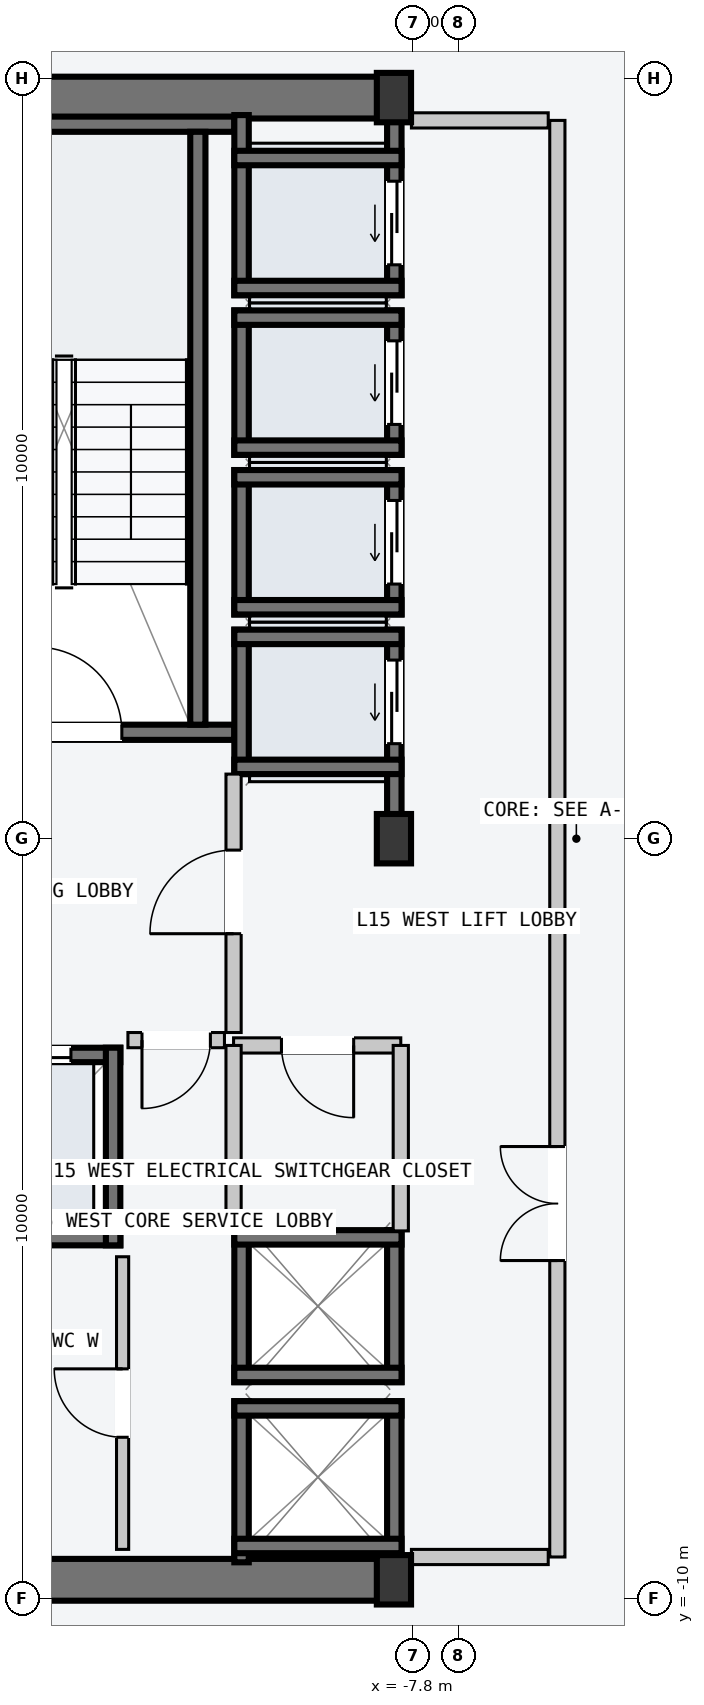
"""IFC4 building model, lengths in metres.
Left out: names, types, materials, properties, quantities, classifications, styles, units other than length and angle.
Written with IfcOpenShell. Run it as: python <this file> out.ifc"""

import sys

from ifc_helpers import new_model, si_unit, direction, frame, frame_2d, origin, origin_2d, place, context, subcontext, project, spatial, rectangle, i_section, extrude, element, fill, save


model = new_model("IFC4")
c1 = context("Model", 3, precision=1e-05, world=origin(), true_north=direction((0.0, 1.0)))
c2 = subcontext(c1, "Body", "Model", "MODEL_VIEW")
j1 = project(units=[si_unit("LENGTHUNIT", "METRE"), si_unit("PLANEANGLEUNIT", "RADIAN")], contexts=[c1])
p1 = place(None, origin())
s1 = spatial("IfcSite", under=j1, at=p1, CompositionType="ELEMENT")
p2 = place(p1, origin())
s2 = spatial("IfcBuilding", under=s1, at=p2, CompositionType="ELEMENT")
p3 = place(p2, frame((0.0, 0.0, 60.0)))
s3 = spatial("IfcBuildingStorey", under=s2, at=p3, CompositionType="ELEMENT", Elevation=60.0)
for number, where, z_axis, x_axis in (
    (1, (-14.53, -9.75, -0.2), (0.0, 0.0, 1.0), (1.0, 0.0, 0.0)),
    (2, (-14.53, 9.75, -0.2), (0.0, 0.0, 1.0), (1.0, 0.0, 0.0)),
):
    element("IfcWall", number, at=place(p3, frame(where, z_axis=z_axis, x_axis=x_axis)), inside=s3, PredefinedType="SHEAR", context=c2, shape_type="SweptSolid", body=[
        extrude(rectangle(XDim=6.46, YDim=0.55, at=frame_2d((3.23, 0.0))), origin(), (0.0, 0.0, 1.0), 3.6),
    ])
p4 = place(p3, frame((-14.25, 1.4, -0.2), z_axis=(0.0, 0.0, 1.0), x_axis=(1.0, 0.0, 0.0)))
e3 = element("IfcWall", 3, at=p4, inside=s3, PredefinedType="SOLIDWALL", context=c2, shape_type="SweptSolid", body=[
    extrude(rectangle(XDim=4.1, YDim=0.2, at=frame_2d((2.05, 0.0))), origin(), (0.0, 0.0, 1.0), 3.6),
])
p5 = place(p4, frame((1.5, 0.0, 0.2)))
e4 = element("IfcOpeningElement", 4, at=p5, cuts=e3, PredefinedType="OPENING", context=c2, shape_type="SweptSolid", body=[
    extrude(rectangle(XDim=1.12, YDim=2.18, at=frame_2d((0.56, 1.09))), frame((0.0, 0.11, 0.0), z_axis=(0.0, -1.0, 0.0), x_axis=(1.0, 0.0, 0.0)), (0.0, 0.0, 1.0), 0.22),
])
p6 = place(p3, frame((-14.25, 9.4, -0.2), z_axis=(0.0, 0.0, 1.0), x_axis=(1.0, 0.0, 0.0)))
e5 = element("IfcWall", 5, at=p6, inside=s3, PredefinedType="SOLIDWALL", context=c2, shape_type="SweptSolid", body=[
    extrude(rectangle(XDim=4.1, YDim=0.2, at=frame_2d((2.05, 0.0))), origin(), (0.0, 0.0, 1.0), 3.6),
])
p7 = place(p3, frame((-10.63, 1.5, -0.2), z_axis=(0.0, 0.0, 1.0), x_axis=(0.0, 1.0, 0.0)))
e6 = element("IfcWall", 6, at=p7, inside=s3, PredefinedType="SOLIDWALL", context=c2, shape_type="SweptSolid", body=[
    extrude(rectangle(XDim=7.8, YDim=0.2, at=frame_2d((3.9, 0.0))), origin(), (0.0, 0.0, 1.0), 3.6),
])
for number, where, z_axis, x_axis in (
    (7, (-8.05, -9.75, 0.0), (0.0, 0.0, 1.0), (1.0, 0.0, 0.0)),
    (8, (-8.05, 0.0, 0.0), (0.0, 0.0, 1.0), (1.0, 0.0, 0.0)),
    (9, (-8.05, 9.75, 0.0), (0.0, 0.0, 1.0), (1.0, 0.0, 0.0)),
):
    element("IfcColumn", number, at=place(p3, frame(where, z_axis=z_axis, x_axis=x_axis)), inside=s3, PredefinedType="COLUMN", context=c2, shape_type="SweptSolid", body=[
        extrude(i_section(OverallWidth=0.45, OverallDepth=0.65, WebThickness=0.025, FlangeThickness=0.04, at=origin_2d()), origin(), (0.0, 0.0, 1.0), 3.6),
    ])
p8 = place(p3, frame((-8.045, 0.21, -0.2), z_axis=(0.0, 0.0, 1.0), x_axis=(0.0, 1.0, 0.0)))
e10 = element("IfcWall", 10, at=p8, inside=s3, PredefinedType="SOLIDWALL", context=c2, shape_type="SweptSolid", body=[
    extrude(rectangle(XDim=2.54, YDim=0.19, at=frame_2d((1.27, 0.0))), origin(), (0.0, 0.0, 1.0), 3.6),
])
p9 = place(p8, frame((1.04, 0.0, 0.2)))
e11 = element("IfcOpeningElement", 11, at=p9, cuts=e10, PredefinedType="OPENING", context=c2, shape_type="SweptSolid", body=[
    extrude(rectangle(XDim=1.1, YDim=2.2, at=frame_2d((0.55, 1.1))), frame((0.0, 0.105, 0.0), z_axis=(0.0, -1.0, 0.0), x_axis=(1.0, 0.0, 0.0)), (0.0, 0.0, 1.0), 0.21),
])
p10 = place(p3, frame((-10.055, 0.85, -0.2), z_axis=(0.0, 0.0, 1.0), x_axis=(0.0, 1.0, 0.0)))
e12 = element("IfcWall", 12, at=p10, inside=s3, PredefinedType="SOLIDWALL", context=c2, shape_type="SweptSolid", body=[
    extrude(rectangle(XDim=1.9, YDim=0.19, at=frame_2d((0.95, 0.0))), origin(), (0.0, 0.0, 1.0), 3.6),
])
for number, where, z_axis, x_axis in (
    (13, (-10.15, 2.655, -0.2), (0.0, 0.0, 1.0), (1.0, 0.0, 0.0)),
    (14, (-10.15, 0.945, -0.2), (0.0, 0.0, 1.0), (1.0, 0.0, 0.0)),
):
    element("IfcWall", number, at=place(p3, frame(where, z_axis=z_axis, x_axis=x_axis)), inside=s3, PredefinedType="SOLIDWALL", context=c2, shape_type="SweptSolid", body=[
        extrude(rectangle(XDim=2.2, YDim=0.19, at=frame_2d((1.1, 0.0))), origin(), (0.0, 0.0, 1.0), 3.6),
    ])
p11 = place(p3, frame((-8.045, 2.95, -0.2), z_axis=(0.0, 0.0, 1.0), x_axis=(0.0, 1.0, 0.0)))
e15 = element("IfcWall", 15, at=p11, inside=s3, PredefinedType="SOLIDWALL", context=c2, shape_type="SweptSolid", body=[
    extrude(rectangle(XDim=1.9, YDim=0.19, at=frame_2d((0.95, 0.0))), origin(), (0.0, 0.0, 1.0), 3.6),
])
p12 = place(p11, frame((0.4, 0.0, 0.2)))
e16 = element("IfcOpeningElement", 16, at=p12, cuts=e15, PredefinedType="OPENING", context=c2, shape_type="SweptSolid", body=[
    extrude(rectangle(XDim=1.1, YDim=2.2, at=frame_2d((0.55, 1.1))), frame((0.0, 0.105, 0.0), z_axis=(0.0, -1.0, 0.0), x_axis=(1.0, 0.0, 0.0)), (0.0, 0.0, 1.0), 0.21),
])
p13 = place(p3, frame((-10.055, 2.95, -0.2), z_axis=(0.0, 0.0, 1.0), x_axis=(0.0, 1.0, 0.0)))
e17 = element("IfcWall", 17, at=p13, inside=s3, PredefinedType="SOLIDWALL", context=c2, shape_type="SweptSolid", body=[
    extrude(rectangle(XDim=1.9, YDim=0.19, at=frame_2d((0.95, 0.0))), origin(), (0.0, 0.0, 1.0), 3.6),
])
for number, where, z_axis, x_axis in (
    (18, (-10.15, 4.755, -0.2), (0.0, 0.0, 1.0), (1.0, 0.0, 0.0)),
    (19, (-10.15, 3.045, -0.2), (0.0, 0.0, 1.0), (1.0, 0.0, 0.0)),
):
    element("IfcWall", number, at=place(p3, frame(where, z_axis=z_axis, x_axis=x_axis)), inside=s3, PredefinedType="SOLIDWALL", context=c2, shape_type="SweptSolid", body=[
        extrude(rectangle(XDim=2.2, YDim=0.19, at=frame_2d((1.1, 0.0))), origin(), (0.0, 0.0, 1.0), 3.6),
    ])
p14 = place(p3, frame((-8.045, 5.05, -0.2), z_axis=(0.0, 0.0, 1.0), x_axis=(0.0, 1.0, 0.0)))
e20 = element("IfcWall", 20, at=p14, inside=s3, PredefinedType="SOLIDWALL", context=c2, shape_type="SweptSolid", body=[
    extrude(rectangle(XDim=1.9, YDim=0.19, at=frame_2d((0.95, 0.0))), origin(), (0.0, 0.0, 1.0), 3.6),
])
p15 = place(p14, frame((0.4, 0.0, 0.2)))
e21 = element("IfcOpeningElement", 21, at=p15, cuts=e20, PredefinedType="OPENING", context=c2, shape_type="SweptSolid", body=[
    extrude(rectangle(XDim=1.1, YDim=2.2, at=frame_2d((0.55, 1.1))), frame((0.0, 0.105, 0.0), z_axis=(0.0, -1.0, 0.0), x_axis=(1.0, 0.0, 0.0)), (0.0, 0.0, 1.0), 0.21),
])
p16 = place(p3, frame((-10.055, 5.05, -0.2), z_axis=(0.0, 0.0, 1.0), x_axis=(0.0, 1.0, 0.0)))
e22 = element("IfcWall", 22, at=p16, inside=s3, PredefinedType="SOLIDWALL", context=c2, shape_type="SweptSolid", body=[
    extrude(rectangle(XDim=1.9, YDim=0.19, at=frame_2d((0.95, 0.0))), origin(), (0.0, 0.0, 1.0), 3.6),
])
for number, where, z_axis, x_axis in (
    (23, (-10.15, 6.855, -0.2), (0.0, 0.0, 1.0), (1.0, 0.0, 0.0)),
    (24, (-10.15, 5.145, -0.2), (0.0, 0.0, 1.0), (1.0, 0.0, 0.0)),
):
    element("IfcWall", number, at=place(p3, frame(where, z_axis=z_axis, x_axis=x_axis)), inside=s3, PredefinedType="SOLIDWALL", context=c2, shape_type="SweptSolid", body=[
        extrude(rectangle(XDim=2.2, YDim=0.19, at=frame_2d((1.1, 0.0))), origin(), (0.0, 0.0, 1.0), 3.6),
    ])
p17 = place(p3, frame((-8.045, 7.15, -0.2), z_axis=(0.0, 0.0, 1.0), x_axis=(0.0, 1.0, 0.0)))
e25 = element("IfcWall", 25, at=p17, inside=s3, PredefinedType="SOLIDWALL", context=c2, shape_type="SweptSolid", body=[
    extrude(rectangle(XDim=2.37, YDim=0.19, at=frame_2d((1.185, 0.0))), origin(), (0.0, 0.0, 1.0), 3.6),
])
p18 = place(p17, frame((0.4, 0.0, 0.2)))
e26 = element("IfcOpeningElement", 26, at=p18, cuts=e25, PredefinedType="OPENING", context=c2, shape_type="SweptSolid", body=[
    extrude(rectangle(XDim=1.1, YDim=2.2, at=frame_2d((0.55, 1.1))), frame((0.0, 0.105, 0.0), z_axis=(0.0, -1.0, 0.0), x_axis=(1.0, 0.0, 0.0)), (0.0, 0.0, 1.0), 0.21),
])
p19 = place(p3, frame((-10.055, 7.15, -0.2), z_axis=(0.0, 0.0, 1.0), x_axis=(0.0, 1.0, 0.0)))
e27 = element("IfcWall", 27, at=p19, inside=s3, PredefinedType="SOLIDWALL", context=c2, shape_type="SweptSolid", body=[
    extrude(rectangle(XDim=2.37, YDim=0.19, at=frame_2d((1.185, 0.0))), origin(), (0.0, 0.0, 1.0), 3.6),
])
for number, where, z_axis, x_axis in (
    (28, (-10.15, 8.955, -0.2), (0.0, 0.0, 1.0), (1.0, 0.0, 0.0)),
    (29, (-10.15, 7.245, -0.2), (0.0, 0.0, 1.0), (1.0, 0.0, 0.0)),
):
    element("IfcWall", number, at=place(p3, frame(where, z_axis=z_axis, x_axis=x_axis)), inside=s3, PredefinedType="SOLIDWALL", context=c2, shape_type="SweptSolid", body=[
        extrude(rectangle(XDim=2.2, YDim=0.19, at=frame_2d((1.1, 0.0))), origin(), (0.0, 0.0, 1.0), 3.6),
    ])
for number, where, z_axis, x_axis in (
    (30, (-8.045, -9.52, -0.2), (0.0, 0.0, 1.0), (0.0, 1.0, 0.0)),
    (31, (-10.055, -9.52, -0.2), (0.0, 0.0, 1.0), (0.0, 1.0, 0.0)),
):
    element("IfcWall", number, at=place(p3, frame(where, z_axis=z_axis, x_axis=x_axis)), inside=s3, PredefinedType="SOLIDWALL", context=c2, shape_type="SweptSolid", body=[
        extrude(rectangle(XDim=2.12, YDim=0.19, at=frame_2d((1.06, 0.0))), origin(), (0.0, 0.0, 1.0), 3.6),
    ])
for number, where, z_axis, x_axis in (
    (32, (-10.15, -7.495, -0.2), (0.0, 0.0, 1.0), (1.0, 0.0, 0.0)),
    (33, (-10.15, -9.305, -0.2), (0.0, 0.0, 1.0), (1.0, 0.0, 0.0)),
):
    element("IfcWall", number, at=place(p3, frame(where, z_axis=z_axis, x_axis=x_axis)), inside=s3, PredefinedType="SOLIDWALL", context=c2, shape_type="SweptSolid", body=[
        extrude(rectangle(XDim=2.2, YDim=0.19, at=frame_2d((1.1, 0.0))), origin(), (0.0, 0.0, 1.0), 3.6),
    ])
for number, where, z_axis, x_axis in (
    (34, (-8.045, -7.15, -0.2), (0.0, 0.0, 1.0), (0.0, 1.0, 0.0)),
    (35, (-10.055, -7.15, -0.2), (0.0, 0.0, 1.0), (0.0, 1.0, 0.0)),
):
    element("IfcWall", number, at=place(p3, frame(where, z_axis=z_axis, x_axis=x_axis)), inside=s3, PredefinedType="SOLIDWALL", context=c2, shape_type="SweptSolid", body=[
        extrude(rectangle(XDim=2.0, YDim=0.19, at=frame_2d((1.0, 0.0))), origin(), (0.0, 0.0, 1.0), 3.6),
    ])
for number, where, z_axis, x_axis in (
    (36, (-10.15, -5.245, -0.2), (0.0, 0.0, 1.0), (1.0, 0.0, 0.0)),
    (37, (-10.15, -7.055, -0.2), (0.0, 0.0, 1.0), (1.0, 0.0, 0.0)),
):
    element("IfcWall", number, at=place(p3, frame(where, z_axis=z_axis, x_axis=x_axis)), inside=s3, PredefinedType="SOLIDWALL", context=c2, shape_type="SweptSolid", body=[
        extrude(rectangle(XDim=2.2, YDim=0.19, at=frame_2d((1.1, 0.0))), origin(), (0.0, 0.0, 1.0), 3.6),
    ])
p20 = place(p3, frame((-14.33, -2.845, -0.2), z_axis=(0.0, 0.0, 1.0), x_axis=(1.0, 0.0, 0.0)))
e38 = element("IfcWall", 38, at=p20, inside=s3, PredefinedType="SOLIDWALL", context=c2, shape_type="SweptSolid", body=[
    extrude(rectangle(XDim=2.68, YDim=0.19, at=frame_2d((1.34, 0.0))), origin(), (0.0, 0.0, 1.0), 3.6),
])
p21 = place(p20, frame((0.83, 0.0, 0.2)))
e39 = element("IfcOpeningElement", 39, at=p21, cuts=e38, PredefinedType="OPENING", context=c2, shape_type="SweptSolid", body=[
    extrude(rectangle(XDim=1.2, YDim=2.2, at=frame_2d((0.6, 1.1))), frame((0.0, 0.105, 0.0), z_axis=(0.0, -1.0, 0.0), x_axis=(1.0, 0.0, 0.0)), (0.0, 0.0, 1.0), 0.21),
])
p22 = place(p3, frame((-14.33, -5.255, -0.2), z_axis=(0.0, 0.0, 1.0), x_axis=(1.0, 0.0, 0.0)))
e40 = element("IfcWall", 40, at=p22, inside=s3, PredefinedType="SOLIDWALL", context=c2, shape_type="SweptSolid", body=[
    extrude(rectangle(XDim=2.68, YDim=0.19, at=frame_2d((1.34, 0.0))), origin(), (0.0, 0.0, 1.0), 3.6),
])
p23 = place(p3, frame((-11.745, -5.35, -0.2), z_axis=(0.0, 0.0, 1.0), x_axis=(0.0, 1.0, 0.0)))
e41 = element("IfcWall", 41, at=p23, inside=s3, PredefinedType="SOLIDWALL", context=c2, shape_type="SweptSolid", body=[
    extrude(rectangle(XDim=2.6, YDim=0.19, at=frame_2d((1.3, 0.0))), origin(), (0.0, 0.0, 1.0), 3.6),
])
p24 = place(p3, frame((-5.9, -9.45, 0.0), z_axis=(0.0, 0.0, 1.0), x_axis=(0.0, 1.0, 0.0)))
e42 = element("IfcWall", 42, at=p24, inside=s3, PredefinedType="PARTITIONING", context=c2, shape_type="SweptSolid", body=[
    extrude(rectangle(XDim=18.9, YDim=0.2, at=frame_2d((9.45, 0.0))), origin(), (0.0, 0.0, 1.0), 3.4),
])
p25 = place(p24, frame((3.9, 0.0, 0.0)))
e43 = element("IfcOpeningElement", 43, at=p25, cuts=e42, PredefinedType="OPENING", context=c2, shape_type="SweptSolid", body=[
    extrude(rectangle(XDim=1.5, YDim=2.2, at=frame_2d((0.75, 1.1))), frame((0.0, 0.11, 0.0), z_axis=(0.0, -1.0, 0.0), x_axis=(1.0, 0.0, 0.0)), (0.0, 0.0, 1.0), 0.22),
])
for number, where, z_axis, x_axis in (
    (44, (-6.02, -9.45, 0.0), (0.0, 0.0, 1.0), (-1.0, 0.0, 0.0)),
    (45, (-6.02, 9.45, 0.0), (0.0, 0.0, 1.0), (-1.0, 0.0, 0.0)),
):
    element("IfcWall", number, at=place(p3, frame(where, z_axis=z_axis, x_axis=x_axis)), inside=s3, PredefinedType="PARTITIONING", context=c2, shape_type="SweptSolid", body=[
        extrude(rectangle(XDim=1.8, YDim=0.2, at=frame_2d((0.9, 0.0))), origin(), (0.0, 0.0, 1.0), 3.4),
    ])
p26 = place(p3, frame((-10.16, -2.55, 0.0), z_axis=(0.0, 0.0, 1.0), x_axis=(0.0, 1.0, 0.0)))
e46 = element("IfcWall", 46, at=p26, inside=s3, PredefinedType="PARTITIONING", context=c2, shape_type="SweptSolid", body=[
    extrude(rectangle(XDim=3.4, YDim=0.2, at=frame_2d((1.7, 0.0))), origin(), (0.0, 0.0, 1.0), 3.4),
])
p27 = place(p26, frame((1.3, 0.0, 0.0)))
e47 = element("IfcOpeningElement", 47, at=p27, cuts=e46, PredefinedType="OPENING", context=c2, shape_type="SweptSolid", body=[
    extrude(rectangle(XDim=1.1, YDim=2.15, at=frame_2d((0.55, 1.075))), frame((0.0, 0.11, 0.0), z_axis=(0.0, -1.0, 0.0), x_axis=(1.0, 0.0, 0.0)), (0.0, 0.0, 1.0), 0.22),
])
p28 = place(p3, frame((-10.28, -2.65, 0.0), z_axis=(0.0, 0.0, 1.0), x_axis=(-1.0, 0.0, 0.0)))
e48 = element("IfcWall", 48, at=p28, inside=s3, PredefinedType="PARTITIONING", context=c2, shape_type="SweptSolid", body=[
    extrude(rectangle(XDim=1.27, YDim=0.2, at=frame_2d((0.635, 0.0))), origin(), (0.0, 0.0, 1.0), 3.4),
])
p29 = place(p28, frame((0.185, 0.0, 0.0)))
e49 = element("IfcOpeningElement", 49, at=p29, cuts=e48, PredefinedType="OPENING", context=c2, shape_type="SweptSolid", body=[
    extrude(rectangle(XDim=0.9, YDim=2.15, at=frame_2d((0.45, 1.075))), frame((0.0, 0.11, 0.0), z_axis=(0.0, -1.0, 0.0), x_axis=(1.0, 0.0, 0.0)), (0.0, 0.0, 1.0), 0.22),
])
p30 = place(p3, frame((-7.96, -2.72, 0.0), z_axis=(0.0, 0.0, 1.0), x_axis=(-1.0, 0.0, 0.0)))
e50 = element("IfcWall", 50, at=p30, inside=s3, PredefinedType="PARTITIONING", context=c2, shape_type="SweptSolid", body=[
    extrude(rectangle(XDim=2.2, YDim=0.2, at=frame_2d((1.1, 0.0))), origin(), (0.0, 0.0, 1.0), 3.4),
])
p31 = place(p30, frame((0.62, 0.0, 0.0)))
e51 = element("IfcOpeningElement", 51, at=p31, cuts=e50, PredefinedType="OPENING", context=c2, shape_type="SweptSolid", body=[
    extrude(rectangle(XDim=0.95, YDim=2.1, at=frame_2d((0.475, 1.05))), frame((0.0, 0.11, 0.0), z_axis=(0.0, -1.0, 0.0), x_axis=(1.0, 0.0, 0.0)), (0.0, 0.0, 1.0), 0.22),
])
for number, where, z_axis, x_axis in (
    (52, (-7.96, -5.16, 0.0), (0.0, 0.0, 1.0), (0.0, 1.0, 0.0)),
    (53, (-10.16, -5.16, 0.0), (0.0, 0.0, 1.0), (0.0, 1.0, 0.0)),
):
    element("IfcWall", number, at=place(p3, frame(where, z_axis=z_axis, x_axis=x_axis)), inside=s3, PredefinedType="PARTITIONING", context=c2, shape_type="SweptSolid", body=[
        extrude(rectangle(XDim=2.44, YDim=0.2, at=frame_2d((1.22, 0.0))), origin(), (0.0, 0.0, 1.0), 3.4),
    ])
p32 = place(p3, frame((-11.62, -9.35, 0.0), z_axis=(0.0, 0.0, 1.0), x_axis=(0.0, 1.0, 0.0)))
e54 = element("IfcWall", 54, at=p32, inside=s3, PredefinedType="PARTITIONING", context=c2, shape_type="SweptSolid", body=[
    extrude(rectangle(XDim=3.85, YDim=0.16, at=frame_2d((1.925, 0.0))), origin(), (0.0, 0.0, 1.0), 3.4),
])
p33 = place(p32, frame((1.475, 0.0, 0.0)))
e55 = element("IfcOpeningElement", 55, at=p33, cuts=e54, PredefinedType="OPENING", context=c2, shape_type="SweptSolid", body=[
    extrude(rectangle(XDim=0.9, YDim=2.15, at=frame_2d((0.45, 1.075))), frame((0.0, 0.09, 0.0), z_axis=(0.0, -1.0, 0.0), x_axis=(1.0, 0.0, 0.0)), (0.0, 0.0, 1.0), 0.18),
])
p34 = place(p5, origin())
e56 = element("IfcDoor", 56, at=p34, inside=s3, OperationType="SINGLE_SWING_LEFT", PredefinedType="DOOR", context=c2, shape_type="SweptSolid", body=[
    extrude(rectangle(XDim=1.12, YDim=2.18, at=frame_2d((0.56, 1.09))), frame((0.0, 0.025, 0.0), z_axis=(0.0, -1.0, 0.0), x_axis=(1.0, 0.0, 0.0)), (0.0, 0.0, 1.0), 0.05),
])
fill(e4, e56)
p35 = place(p9, origin())
e57 = element("IfcDoor", 57, at=p35, inside=s3, OperationType="SLIDING_TO_LEFT", PredefinedType="DOOR", context=c2, shape_type="SweptSolid", body=[
    extrude(rectangle(XDim=1.1, YDim=2.2, at=frame_2d((0.55, 1.1))), frame((0.0, 0.025, 0.0), z_axis=(0.0, -1.0, 0.0), x_axis=(1.0, 0.0, 0.0)), (0.0, 0.0, 1.0), 0.05),
])
fill(e11, e57)
p36 = place(p12, origin())
e58 = element("IfcDoor", 58, at=p36, inside=s3, OperationType="SLIDING_TO_LEFT", PredefinedType="DOOR", context=c2, shape_type="SweptSolid", body=[
    extrude(rectangle(XDim=1.1, YDim=2.2, at=frame_2d((0.55, 1.1))), frame((0.0, 0.025, 0.0), z_axis=(0.0, -1.0, 0.0), x_axis=(1.0, 0.0, 0.0)), (0.0, 0.0, 1.0), 0.05),
])
fill(e16, e58)
p37 = place(p15, origin())
e59 = element("IfcDoor", 59, at=p37, inside=s3, OperationType="SLIDING_TO_LEFT", PredefinedType="DOOR", context=c2, shape_type="SweptSolid", body=[
    extrude(rectangle(XDim=1.1, YDim=2.2, at=frame_2d((0.55, 1.1))), frame((0.0, 0.025, 0.0), z_axis=(0.0, -1.0, 0.0), x_axis=(1.0, 0.0, 0.0)), (0.0, 0.0, 1.0), 0.05),
])
fill(e21, e59)
p38 = place(p18, origin())
e60 = element("IfcDoor", 60, at=p38, inside=s3, OperationType="SLIDING_TO_LEFT", PredefinedType="DOOR", context=c2, shape_type="SweptSolid", body=[
    extrude(rectangle(XDim=1.1, YDim=2.2, at=frame_2d((0.55, 1.1))), frame((0.0, 0.025, 0.0), z_axis=(0.0, -1.0, 0.0), x_axis=(1.0, 0.0, 0.0)), (0.0, 0.0, 1.0), 0.05),
])
fill(e26, e60)
p39 = place(p21, origin())
e61 = element("IfcDoor", 61, at=p39, inside=s3, OperationType="SLIDING_TO_LEFT", PredefinedType="DOOR", context=c2, shape_type="SweptSolid", body=[
    extrude(rectangle(XDim=1.2, YDim=2.2, at=frame_2d((0.6, 1.1))), frame((0.0, 0.025, 0.0), z_axis=(0.0, -1.0, 0.0), x_axis=(1.0, 0.0, 0.0)), (0.0, 0.0, 1.0), 0.05),
])
fill(e39, e61)
p40 = place(p25, origin())
e62 = element("IfcDoor", 62, at=p40, inside=s3, OperationType="DOUBLE_DOOR_SINGLE_SWING", PredefinedType="DOOR", context=c2, shape_type="SweptSolid", body=[
    extrude(rectangle(XDim=1.5, YDim=2.2, at=frame_2d((0.75, 1.1))), frame((0.0, 0.025, 0.0), z_axis=(0.0, -1.0, 0.0), x_axis=(1.0, 0.0, 0.0)), (0.0, 0.0, 1.0), 0.05),
])
fill(e43, e62)
p41 = place(p27, origin())
e63 = element("IfcDoor", 63, at=p41, inside=s3, OperationType="SINGLE_SWING_LEFT", PredefinedType="DOOR", context=c2, shape_type="SweptSolid", body=[
    extrude(rectangle(XDim=1.1, YDim=2.15, at=frame_2d((0.55, 1.075))), frame((0.0, 0.025, 0.0), z_axis=(0.0, -1.0, 0.0), x_axis=(1.0, 0.0, 0.0)), (0.0, 0.0, 1.0), 0.05),
])
fill(e47, e63)
p42 = place(p29, origin())
e64 = element("IfcDoor", 64, at=p42, inside=s3, OperationType="SINGLE_SWING_RIGHT", PredefinedType="DOOR", context=c2, shape_type="SweptSolid", body=[
    extrude(rectangle(XDim=0.9, YDim=2.15, at=frame_2d((0.45, 1.075))), frame((0.0, 0.025, 0.0), z_axis=(0.0, -1.0, 0.0), x_axis=(1.0, 0.0, 0.0)), (0.0, 0.0, 1.0), 0.05),
])
fill(e49, e64)
p43 = place(p31, origin())
e65 = element("IfcDoor", 65, at=p43, inside=s3, OperationType="SINGLE_SWING_LEFT", PredefinedType="DOOR", context=c2, shape_type="SweptSolid", body=[
    extrude(rectangle(XDim=0.95, YDim=2.1, at=frame_2d((0.475, 1.05))), frame((0.0, 0.025, 0.0), z_axis=(0.0, -1.0, 0.0), x_axis=(1.0, 0.0, 0.0)), (0.0, 0.0, 1.0), 0.05),
])
fill(e51, e65)
p44 = place(p33, origin())
e66 = element("IfcDoor", 66, at=p44, inside=s3, OperationType="SINGLE_SWING_RIGHT", PredefinedType="DOOR", context=c2, shape_type="SweptSolid", body=[
    extrude(rectangle(XDim=0.9, YDim=2.15, at=frame_2d((0.45, 1.075))), frame((0.0, 0.025, 0.0), z_axis=(0.0, -1.0, 0.0), x_axis=(1.0, 0.0, 0.0)), (0.0, 0.0, 1.0), 0.05),
])
fill(e55, e66)
save(model, sys.argv[1])
